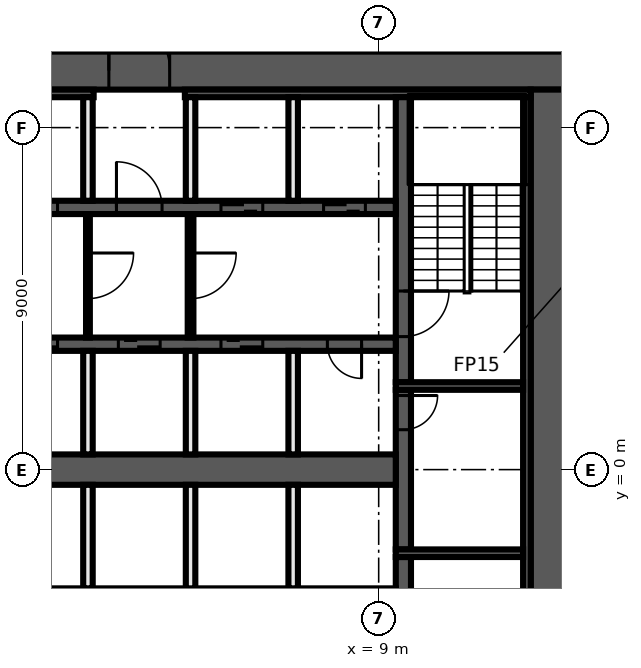
"""IFC4 building model, lengths in metres.
Left out: names, types, materials, properties, quantities, classifications, styles, units other than length and angle.
Written with IfcOpenShell. Run it as: python <this file> out.ifc"""

import sys

from ifc_helpers import new_model, si_unit, direction, frame, frame_2d, origin, place, context, subcontext, project, spatial, rectangle, extrude, element, fill, save


model = new_model("IFC4")
c1 = context("Model", 3, precision=1e-05, world=origin(), true_north=direction((0.0, 1.0)))
c2 = subcontext(c1, "Body", "Model", "MODEL_VIEW")
j1 = project(units=[si_unit("LENGTHUNIT", "METRE"), si_unit("PLANEANGLEUNIT", "RADIAN")], contexts=[c1])
p1 = place(None, origin())
s1 = spatial("IfcSite", under=j1, at=p1, CompositionType="ELEMENT")
p2 = place(p1, origin())
s2 = spatial("IfcBuilding", under=s1, at=p2, CompositionType="ELEMENT")
p3 = place(p2, frame((0.0, 0.0, 98.9)))
s3 = spatial("IfcBuildingStorey", under=s2, at=p3, CompositionType="ELEMENT", Elevation=98.9)
for number, where, z_axis, x_axis in (
    (1, (3.6, 11.0, 0.0), (0.0, 0.0, 1.0), (0.0, 1.0, 0.0)),
    (2, (1.8, 11.0, 0.0), (0.0, 0.0, 1.0), (0.0, 1.0, 0.0)),
):
    element("IfcWall", number, at=place(p3, frame(where, z_axis=z_axis, x_axis=x_axis)), inside=s3, PredefinedType="PARTITIONING", context=c2, shape_type="SweptSolid", body=[
        extrude(rectangle(XDim=1.175, YDim=0.15, at=frame_2d((0.587, 0.0))), origin(), (0.0, 0.0, 1.0), 3.25),
    ])
p4 = place(p3, frame((-14.0, 10.5, 0.0), z_axis=(0.0, 0.0, 1.0), x_axis=(1.0, 0.0, 0.0)))
e3 = element("IfcWall", 3, at=p4, inside=s3, PredefinedType="SHEAR", context=c2, shape_type="SweptSolid", body=[
    extrude(rectangle(XDim=28.0, YDim=1.0, at=frame_2d((14.0, 0.0))), origin(), (0.0, 0.0, 1.0), 3.25),
])
p5 = place(p4, frame((15.9, 0.0, 0.0)))
e4 = element("IfcOpeningElement", 4, at=p5, cuts=e3, PredefinedType="OPENING", context=c2, shape_type="SweptSolid", body=[
    extrude(rectangle(XDim=1.6, YDim=2.1, at=frame_2d((0.8, 1.05))), frame((0.0, 0.51, 0.0), z_axis=(0.0, -1.0, 0.0), x_axis=(1.0, 0.0, 0.0)), (0.0, 0.0, 1.0), 1.02),
])
p6 = place(p3, frame((13.5, 10.0, 0.0), z_axis=(0.0, 0.0, 1.0), x_axis=(0.0, -1.0, 0.0)))
e5 = element("IfcWall", 5, at=p6, inside=s3, PredefinedType="SHEAR", context=c2, shape_type="SweptSolid", body=[
    extrude(rectangle(XDim=20.0, YDim=1.0, at=frame_2d((10.0, 0.0))), origin(), (0.0, 0.0, 1.0), 3.25),
])
p7 = place(p3, frame((-13.0, 9.9, 0.0), z_axis=(0.0, 0.0, 1.0), x_axis=(1.0, 0.0, 0.0)))
e6 = element("IfcWall", 6, at=p7, inside=s3, PredefinedType="SHEAR", context=c2, shape_type="SweptSolid", body=[
    extrude(rectangle(XDim=14.5, YDim=0.2, at=frame_2d((7.25, 0.0))), origin(), (0.0, 0.0, 1.0), 3.25),
])
p8 = place(p3, frame((3.9, 9.9, 0.0), z_axis=(0.0, 0.0, 1.0), x_axis=(1.0, 0.0, 0.0)))
e7 = element("IfcWall", 7, at=p8, inside=s3, PredefinedType="SHEAR", context=c2, shape_type="SweptSolid", body=[
    extrude(rectangle(XDim=9.1, YDim=0.2, at=frame_2d((4.55, 0.0))), origin(), (0.0, 0.0, 1.0), 3.25),
])
p9 = place(p3, frame((12.9, 9.8, 0.0), z_axis=(0.0, 0.0, 1.0), x_axis=(0.0, -1.0, 0.0)))
e8 = element("IfcWall", 8, at=p9, inside=s3, PredefinedType="SHEAR", context=c2, shape_type="SweptSolid", body=[
    extrude(rectangle(XDim=19.6, YDim=0.2, at=frame_2d((9.8, 0.0))), origin(), (0.0, 0.0, 1.0), 3.25),
])
p10 = place(p3, frame((9.65, -2.3, 0.0), z_axis=(0.0, 0.0, 1.0), x_axis=(0.0, -1.0, 0.0)))
e9 = element("IfcWall", 9, at=p10, inside=s3, PredefinedType="SHEAR", context=c2, shape_type="SweptSolid", body=[
    extrude(rectangle(XDim=7.5, YDim=0.4, at=frame_2d((3.75, 0.0))), origin(), (0.0, 0.0, 1.0), 3.25),
])
p11 = place(p10, frame((1.2, 0.0, 0.0)))
e10 = element("IfcOpeningElement", 10, at=p11, cuts=e9, PredefinedType="OPENING", context=c2, shape_type="SweptSolid", body=[
    extrude(rectangle(XDim=1.2, YDim=2.1, at=frame_2d((0.6, 1.05))), frame((0.0, 0.21, 0.0), z_axis=(0.0, -1.0, 0.0), x_axis=(1.0, 0.0, 0.0)), (0.0, 0.0, 1.0), 0.42),
])
p12 = place(p3, frame((9.65, 2.1, 0.0), z_axis=(0.0, 0.0, 1.0), x_axis=(0.0, -1.0, 0.0)))
e11 = element("IfcWall", 11, at=p12, inside=s3, PredefinedType="SHEAR", context=c2, shape_type="SweptSolid", body=[
    extrude(rectangle(XDim=4.2, YDim=0.4, at=frame_2d((2.1, 0.0))), origin(), (0.0, 0.0, 1.0), 3.25),
])
p13 = place(p12, frame((0.15, 0.0, 0.0)))
e12 = element("IfcOpeningElement", 12, at=p13, cuts=e11, PredefinedType="OPENING", context=c2, shape_type="SweptSolid", body=[
    extrude(rectangle(XDim=0.9, YDim=2.1, at=frame_2d((0.45, 1.05))), frame((0.0, 0.21, 0.0), z_axis=(0.0, -1.0, 0.0), x_axis=(1.0, 0.0, 0.0)), (0.0, 0.0, 1.0), 0.42),
])
p14 = place(p3, frame((9.65, 9.8, 0.0), z_axis=(0.0, 0.0, 1.0), x_axis=(0.0, -1.0, 0.0)))
e13 = element("IfcWall", 13, at=p14, inside=s3, PredefinedType="SHEAR", context=c2, shape_type="SweptSolid", body=[
    extrude(rectangle(XDim=7.5, YDim=0.4, at=frame_2d((3.75, 0.0))), origin(), (0.0, 0.0, 1.0), 3.25),
])
p15 = place(p14, frame((5.1, 0.0, 0.0)))
e14 = element("IfcOpeningElement", 14, at=p15, cuts=e13, PredefinedType="OPENING", context=c2, shape_type="SweptSolid", body=[
    extrude(rectangle(XDim=1.2, YDim=2.1, at=frame_2d((0.6, 1.05))), frame((0.0, 0.21, 0.0), z_axis=(0.0, -1.0, 0.0), x_axis=(1.0, 0.0, 0.0)), (0.0, 0.0, 1.0), 0.42),
])
for number, where, z_axis, x_axis in (
    (15, (9.45, 2.2, 0.0), (0.0, 0.0, 1.0), (1.0, 0.0, 0.0)),
    (16, (9.45, -2.2, 0.0), (0.0, 0.0, 1.0), (1.0, 0.0, 0.0)),
):
    element("IfcWall", number, at=place(p3, frame(where, z_axis=z_axis, x_axis=x_axis)), inside=s3, PredefinedType="SHEAR", context=c2, shape_type="SweptSolid", body=[
        extrude(rectangle(XDim=3.35, YDim=0.2, at=frame_2d((1.675, 0.0))), origin(), (0.0, 0.0, 1.0), 3.25),
    ])
p16 = place(p3, frame((-9.45, 6.9, 0.0), z_axis=(0.0, 0.0, 1.0), x_axis=(1.0, 0.0, 0.0)))
e17 = element("IfcWall", 17, at=p16, inside=s3, PredefinedType="SHEAR", context=c2, shape_type="SweptSolid", body=[
    extrude(rectangle(XDim=18.9, YDim=0.35, at=frame_2d((9.45, 0.0))), origin(), (0.0, 0.0, 1.0), 3.25),
])
p17 = place(p16, frame((0.8, 0.0, 0.0)))
e18 = element("IfcOpeningElement", 18, at=p17, cuts=e17, PredefinedType="OPENING", context=c2, shape_type="SweptSolid", body=[
    extrude(rectangle(XDim=1.1, YDim=2.1, at=frame_2d((0.55, 1.05))), frame((0.0, 0.185, 0.0), z_axis=(0.0, -1.0, 0.0), x_axis=(1.0, 0.0, 0.0)), (0.0, 0.0, 1.0), 0.37),
])
p18 = place(p16, frame((3.5, 0.0, 0.0)))
e19 = element("IfcOpeningElement", 19, at=p18, cuts=e17, PredefinedType="OPENING", context=c2, shape_type="SweptSolid", body=[
    extrude(rectangle(XDim=1.1, YDim=2.1, at=frame_2d((0.55, 1.05))), frame((0.0, 0.185, 0.0), z_axis=(0.0, -1.0, 0.0), x_axis=(1.0, 0.0, 0.0)), (0.0, 0.0, 1.0), 0.37),
])
p19 = place(p16, frame((6.2, 0.0, 0.0)))
e20 = element("IfcOpeningElement", 20, at=p19, cuts=e17, PredefinedType="OPENING", context=c2, shape_type="SweptSolid", body=[
    extrude(rectangle(XDim=1.1, YDim=2.1, at=frame_2d((0.55, 1.05))), frame((0.0, 0.185, 0.0), z_axis=(0.0, -1.0, 0.0), x_axis=(1.0, 0.0, 0.0)), (0.0, 0.0, 1.0), 0.37),
])
p20 = place(p16, frame((8.9, 0.0, 0.0)))
e21 = element("IfcOpeningElement", 21, at=p20, cuts=e17, PredefinedType="OPENING", context=c2, shape_type="SweptSolid", body=[
    extrude(rectangle(XDim=1.1, YDim=2.1, at=frame_2d((0.55, 1.05))), frame((0.0, 0.185, 0.0), z_axis=(0.0, -1.0, 0.0), x_axis=(1.0, 0.0, 0.0)), (0.0, 0.0, 1.0), 0.37),
])
p21 = place(p16, frame((11.55, 0.0, 0.0)))
e22 = element("IfcOpeningElement", 22, at=p21, cuts=e17, PredefinedType="OPENING", context=c2, shape_type="SweptSolid", body=[
    extrude(rectangle(XDim=1.2, YDim=2.1, at=frame_2d((0.6, 1.05))), frame((0.0, 0.185, 0.0), z_axis=(0.0, -1.0, 0.0), x_axis=(1.0, 0.0, 0.0)), (0.0, 0.0, 1.0), 0.37),
])
p22 = place(p16, frame((14.3, 0.0, 0.0)))
e23 = element("IfcOpeningElement", 23, at=p22, cuts=e17, PredefinedType="OPENING", context=c2, shape_type="SweptSolid", body=[
    extrude(rectangle(XDim=1.1, YDim=2.1, at=frame_2d((0.55, 1.05))), frame((0.0, 0.185, 0.0), z_axis=(0.0, -1.0, 0.0), x_axis=(1.0, 0.0, 0.0)), (0.0, 0.0, 1.0), 0.37),
])
p23 = place(p16, frame((17.0, 0.0, 0.0)))
e24 = element("IfcOpeningElement", 24, at=p23, cuts=e17, PredefinedType="OPENING", context=c2, shape_type="SweptSolid", body=[
    extrude(rectangle(XDim=1.1, YDim=2.1, at=frame_2d((0.55, 1.05))), frame((0.0, 0.185, 0.0), z_axis=(0.0, -1.0, 0.0), x_axis=(1.0, 0.0, 0.0)), (0.0, 0.0, 1.0), 0.37),
])
p24 = place(p3, frame((9.45, 3.3, 0.0), z_axis=(0.0, 0.0, 1.0), x_axis=(-1.0, 0.0, 0.0)))
e25 = element("IfcWall", 25, at=p24, inside=s3, PredefinedType="SHEAR", context=c2, shape_type="SweptSolid", body=[
    extrude(rectangle(XDim=18.9, YDim=0.35, at=frame_2d((9.45, 0.0))), origin(), (0.0, 0.0, 1.0), 3.25),
])
p25 = place(p24, frame((17.0, 0.0, 0.0)))
e26 = element("IfcOpeningElement", 26, at=p25, cuts=e25, PredefinedType="OPENING", context=c2, shape_type="SweptSolid", body=[
    extrude(rectangle(XDim=1.1, YDim=2.1, at=frame_2d((0.55, 1.05))), frame((0.0, 0.185, 0.0), z_axis=(0.0, -1.0, 0.0), x_axis=(1.0, 0.0, 0.0)), (0.0, 0.0, 1.0), 0.37),
])
p26 = place(p24, frame((14.3, 0.0, 0.0)))
e27 = element("IfcOpeningElement", 27, at=p26, cuts=e25, PredefinedType="OPENING", context=c2, shape_type="SweptSolid", body=[
    extrude(rectangle(XDim=1.1, YDim=2.1, at=frame_2d((0.55, 1.05))), frame((0.0, 0.185, 0.0), z_axis=(0.0, -1.0, 0.0), x_axis=(1.0, 0.0, 0.0)), (0.0, 0.0, 1.0), 0.37),
])
p27 = place(p24, frame((11.6, 0.0, 0.0)))
e28 = element("IfcOpeningElement", 28, at=p27, cuts=e25, PredefinedType="OPENING", context=c2, shape_type="SweptSolid", body=[
    extrude(rectangle(XDim=1.1, YDim=2.1, at=frame_2d((0.55, 1.05))), frame((0.0, 0.185, 0.0), z_axis=(0.0, -1.0, 0.0), x_axis=(1.0, 0.0, 0.0)), (0.0, 0.0, 1.0), 0.37),
])
p28 = place(p24, frame((8.9, 0.0, 0.0)))
e29 = element("IfcOpeningElement", 29, at=p28, cuts=e25, PredefinedType="OPENING", context=c2, shape_type="SweptSolid", body=[
    extrude(rectangle(XDim=1.1, YDim=2.1, at=frame_2d((0.55, 1.05))), frame((0.0, 0.185, 0.0), z_axis=(0.0, -1.0, 0.0), x_axis=(1.0, 0.0, 0.0)), (0.0, 0.0, 1.0), 0.37),
])
p29 = place(p24, frame((6.2, 0.0, 0.0)))
e30 = element("IfcOpeningElement", 30, at=p29, cuts=e25, PredefinedType="OPENING", context=c2, shape_type="SweptSolid", body=[
    extrude(rectangle(XDim=1.1, YDim=2.1, at=frame_2d((0.55, 1.05))), frame((0.0, 0.185, 0.0), z_axis=(0.0, -1.0, 0.0), x_axis=(1.0, 0.0, 0.0)), (0.0, 0.0, 1.0), 0.37),
])
p30 = place(p24, frame((3.5, 0.0, 0.0)))
e31 = element("IfcOpeningElement", 31, at=p30, cuts=e25, PredefinedType="OPENING", context=c2, shape_type="SweptSolid", body=[
    extrude(rectangle(XDim=1.1, YDim=2.1, at=frame_2d((0.55, 1.05))), frame((0.0, 0.185, 0.0), z_axis=(0.0, -1.0, 0.0), x_axis=(1.0, 0.0, 0.0)), (0.0, 0.0, 1.0), 0.37),
])
p31 = place(p24, frame((0.9, 0.0, 0.0)))
e32 = element("IfcOpeningElement", 32, at=p31, cuts=e25, PredefinedType="OPENING", context=c2, shape_type="SweptSolid", body=[
    extrude(rectangle(XDim=0.9, YDim=2.1, at=frame_2d((0.45, 1.05))), frame((0.0, 0.185, 0.0), z_axis=(0.0, -1.0, 0.0), x_axis=(1.0, 0.0, 0.0)), (0.0, 0.0, 1.0), 0.37),
])
p32 = place(p3, frame((-9.45, 0.0, 0.0), z_axis=(0.0, 0.0, 1.0), x_axis=(1.0, 0.0, 0.0)))
e33 = element("IfcWall", 33, at=p32, inside=s3, PredefinedType="SHEAR", context=c2, shape_type="SweptSolid", body=[
    extrude(rectangle(XDim=18.9, YDim=0.8, at=frame_2d((9.45, 0.0))), origin(), (0.0, 0.0, 1.0), 3.25),
])
for number, where, z_axis, x_axis in (
    (34, (6.75, -3.125, 0.0), (0.0, 0.0, 1.0), (0.0, 1.0, 0.0)),
    (35, (6.75, 0.4, 0.0), (0.0, 0.0, 1.0), (0.0, 1.0, 0.0)),
    (36, (6.75, 7.075, 0.0), (0.0, 0.0, 1.0), (0.0, 1.0, 0.0)),
):
    element("IfcWall", number, at=place(p3, frame(where, z_axis=z_axis, x_axis=x_axis)), inside=s3, PredefinedType="SOLIDWALL", context=c2, shape_type="SweptSolid", body=[
        extrude(rectangle(XDim=2.725, YDim=0.25, at=frame_2d((1.363, 0.0))), origin(), (0.0, 0.0, 1.0), 3.25),
    ])
p33 = place(p3, frame((4.05, 6.725, 0.0), z_axis=(0.0, 0.0, 1.0), x_axis=(0.0, -1.0, 0.0)))
e37 = element("IfcWall", 37, at=p33, inside=s3, PredefinedType="PARTITIONING", context=c2, shape_type="SweptSolid", body=[
    extrude(rectangle(XDim=3.25, YDim=0.15, at=frame_2d((1.625, 0.0))), origin(), (0.0, 0.0, 1.0), 3.25),
])
p34 = place(p33, frame((1.025, 0.0, 0.0)))
e38 = element("IfcOpeningElement", 38, at=p34, cuts=e37, PredefinedType="OPENING", context=c2, shape_type="SweptSolid", body=[
    extrude(rectangle(XDim=1.2, YDim=2.1, at=frame_2d((0.6, 1.05))), frame((0.0, 0.085, 0.0), z_axis=(0.0, -1.0, 0.0), x_axis=(1.0, 0.0, 0.0)), (0.0, 0.0, 1.0), 0.17),
])
for number, where, z_axis, x_axis in (
    (39, (4.05, -3.125, 0.0), (0.0, 0.0, 1.0), (0.0, 1.0, 0.0)),
    (40, (4.05, 0.4, 0.0), (0.0, 0.0, 1.0), (0.0, 1.0, 0.0)),
    (41, (4.05, 7.075, 0.0), (0.0, 0.0, 1.0), (0.0, 1.0, 0.0)),
):
    element("IfcWall", number, at=place(p3, frame(where, z_axis=z_axis, x_axis=x_axis)), inside=s3, PredefinedType="SOLIDWALL", context=c2, shape_type="SweptSolid", body=[
        extrude(rectangle(XDim=2.725, YDim=0.25, at=frame_2d((1.363, 0.0))), origin(), (0.0, 0.0, 1.0), 3.25),
    ])
p35 = place(p3, frame((1.35, 6.725, 0.0), z_axis=(0.0, 0.0, 1.0), x_axis=(0.0, -1.0, 0.0)))
e42 = element("IfcWall", 42, at=p35, inside=s3, PredefinedType="PARTITIONING", context=c2, shape_type="SweptSolid", body=[
    extrude(rectangle(XDim=3.25, YDim=0.1, at=frame_2d((1.625, 0.0))), origin(), (0.0, 0.0, 1.0), 3.25),
])
p36 = place(p35, frame((1.025, 0.0, 0.0)))
e43 = element("IfcOpeningElement", 43, at=p36, cuts=e42, PredefinedType="OPENING", context=c2, shape_type="SweptSolid", body=[
    extrude(rectangle(XDim=1.2, YDim=2.1, at=frame_2d((0.6, 1.05))), frame((0.0, 0.06, 0.0), z_axis=(0.0, -1.0, 0.0), x_axis=(1.0, 0.0, 0.0)), (0.0, 0.0, 1.0), 0.12),
])
for number, where, z_axis, x_axis in (
    (44, (1.35, -3.125, 0.0), (0.0, 0.0, 1.0), (0.0, 1.0, 0.0)),
    (45, (1.35, 0.4, 0.0), (0.0, 0.0, 1.0), (0.0, 1.0, 0.0)),
    (46, (1.35, 7.075, 0.0), (0.0, 0.0, 1.0), (0.0, 1.0, 0.0)),
):
    element("IfcWall", number, at=place(p3, frame(where, z_axis=z_axis, x_axis=x_axis)), inside=s3, PredefinedType="SOLIDWALL", context=c2, shape_type="SweptSolid", body=[
        extrude(rectangle(XDim=2.725, YDim=0.25, at=frame_2d((1.363, 0.0))), origin(), (0.0, 0.0, 1.0), 3.25),
    ])
p37 = place(p13, origin())
e47 = element("IfcDoor", 47, at=p37, inside=s3, OperationType="SINGLE_SWING_RIGHT", PredefinedType="DOOR", context=c2, shape_type="SweptSolid", body=[
    extrude(rectangle(XDim=0.9, YDim=2.1, at=frame_2d((0.45, 1.05))), frame((0.0, 0.025, 0.0), z_axis=(0.0, -1.0, 0.0), x_axis=(1.0, 0.0, 0.0)), (0.0, 0.0, 1.0), 0.05),
])
fill(e12, e47)
p38 = place(p20, origin())
e48 = element("IfcDoor", 48, at=p38, inside=s3, OperationType="DOUBLE_DOOR_SLIDING", PredefinedType="DOOR", context=c2, shape_type="SweptSolid", body=[
    extrude(rectangle(XDim=1.1, YDim=2.1, at=frame_2d((0.55, 1.05))), frame((0.0, 0.025, 0.0), z_axis=(0.0, -1.0, 0.0), x_axis=(1.0, 0.0, 0.0)), (0.0, 0.0, 1.0), 0.05),
])
fill(e21, e48)
p39 = place(p5, origin())
e49 = element("IfcDoor", 49, at=p39, inside=s3, OperationType="DOUBLE_DOOR_SINGLE_SWING", PredefinedType="DOOR", context=c2, shape_type="SweptSolid", body=[
    extrude(rectangle(XDim=1.6, YDim=2.1, at=frame_2d((0.8, 1.05))), frame((0.0, 0.025, 0.0), z_axis=(0.0, -1.0, 0.0), x_axis=(1.0, 0.0, 0.0)), (0.0, 0.0, 1.0), 0.05),
])
fill(e4, e49)
p40 = place(p21, origin())
e50 = element("IfcDoor", 50, at=p40, inside=s3, OperationType="SINGLE_SWING_LEFT", PredefinedType="DOOR", context=c2, shape_type="SweptSolid", body=[
    extrude(rectangle(XDim=1.2, YDim=2.1, at=frame_2d((0.6, 1.05))), frame((0.0, 0.025, 0.0), z_axis=(0.0, -1.0, 0.0), x_axis=(1.0, 0.0, 0.0)), (0.0, 0.0, 1.0), 0.05),
])
fill(e22, e50)
p41 = place(p22, origin())
e51 = element("IfcDoor", 51, at=p41, inside=s3, OperationType="DOUBLE_DOOR_SLIDING", PredefinedType="DOOR", context=c2, shape_type="SweptSolid", body=[
    extrude(rectangle(XDim=1.1, YDim=2.1, at=frame_2d((0.55, 1.05))), frame((0.0, 0.025, 0.0), z_axis=(0.0, -1.0, 0.0), x_axis=(1.0, 0.0, 0.0)), (0.0, 0.0, 1.0), 0.05),
])
fill(e23, e51)
p42 = place(p23, origin())
e52 = element("IfcDoor", 52, at=p42, inside=s3, OperationType="DOUBLE_DOOR_SLIDING", PredefinedType="DOOR", context=c2, shape_type="SweptSolid", body=[
    extrude(rectangle(XDim=1.1, YDim=2.1, at=frame_2d((0.55, 1.05))), frame((0.0, 0.025, 0.0), z_axis=(0.0, -1.0, 0.0), x_axis=(1.0, 0.0, 0.0)), (0.0, 0.0, 1.0), 0.05),
])
fill(e24, e52)
p43 = place(p28, origin())
e53 = element("IfcDoor", 53, at=p43, inside=s3, OperationType="DOUBLE_DOOR_SLIDING", PredefinedType="DOOR", context=c2, shape_type="SweptSolid", body=[
    extrude(rectangle(XDim=1.1, YDim=2.1, at=frame_2d((0.55, 1.05))), frame((0.0, 0.025, 0.0), z_axis=(0.0, -1.0, 0.0), x_axis=(1.0, 0.0, 0.0)), (0.0, 0.0, 1.0), 0.05),
])
fill(e29, e53)
p44 = place(p29, origin())
e54 = element("IfcDoor", 54, at=p44, inside=s3, OperationType="DOUBLE_DOOR_SLIDING", PredefinedType="DOOR", context=c2, shape_type="SweptSolid", body=[
    extrude(rectangle(XDim=1.1, YDim=2.1, at=frame_2d((0.55, 1.05))), frame((0.0, 0.025, 0.0), z_axis=(0.0, -1.0, 0.0), x_axis=(1.0, 0.0, 0.0)), (0.0, 0.0, 1.0), 0.05),
])
fill(e30, e54)
p45 = place(p30, origin())
e55 = element("IfcDoor", 55, at=p45, inside=s3, OperationType="DOUBLE_DOOR_SLIDING", PredefinedType="DOOR", context=c2, shape_type="SweptSolid", body=[
    extrude(rectangle(XDim=1.1, YDim=2.1, at=frame_2d((0.55, 1.05))), frame((0.0, 0.025, 0.0), z_axis=(0.0, -1.0, 0.0), x_axis=(1.0, 0.0, 0.0)), (0.0, 0.0, 1.0), 0.05),
])
fill(e31, e55)
p46 = place(p31, origin())
e56 = element("IfcDoor", 56, at=p46, inside=s3, OperationType="SINGLE_SWING_LEFT", PredefinedType="DOOR", context=c2, shape_type="SweptSolid", body=[
    extrude(rectangle(XDim=0.9, YDim=2.1, at=frame_2d((0.45, 1.05))), frame((0.0, 0.025, 0.0), z_axis=(0.0, -1.0, 0.0), x_axis=(1.0, 0.0, 0.0)), (0.0, 0.0, 1.0), 0.05),
])
fill(e32, e56)
p47 = place(p15, origin())
e57 = element("IfcDoor", 57, at=p47, inside=s3, OperationType="SINGLE_SWING_LEFT", PredefinedType="DOOR", context=c2, shape_type="SweptSolid", body=[
    extrude(rectangle(XDim=1.2, YDim=2.1, at=frame_2d((0.6, 1.05))), frame((0.0, 0.025, 0.0), z_axis=(0.0, -1.0, 0.0), x_axis=(1.0, 0.0, 0.0)), (0.0, 0.0, 1.0), 0.05),
])
fill(e14, e57)
p48 = place(p36, origin())
e58 = element("IfcDoor", 58, at=p48, inside=s3, OperationType="SINGLE_SWING_LEFT", PredefinedType="DOOR", context=c2, shape_type="SweptSolid", body=[
    extrude(rectangle(XDim=1.2, YDim=2.1, at=frame_2d((0.6, 1.05))), frame((0.0, 0.025, 0.0), z_axis=(0.0, -1.0, 0.0), x_axis=(1.0, 0.0, 0.0)), (0.0, 0.0, 1.0), 0.05),
])
fill(e43, e58)
p49 = place(p34, origin())
e59 = element("IfcDoor", 59, at=p49, inside=s3, OperationType="SINGLE_SWING_RIGHT", PredefinedType="DOOR", context=c2, shape_type="SweptSolid", body=[
    extrude(rectangle(XDim=1.2, YDim=2.1, at=frame_2d((0.6, 1.05))), frame((0.0, 0.025, 0.0), z_axis=(0.0, -1.0, 0.0), x_axis=(1.0, 0.0, 0.0)), (0.0, 0.0, 1.0), 0.05),
])
fill(e38, e59)
save(model, sys.argv[1])
